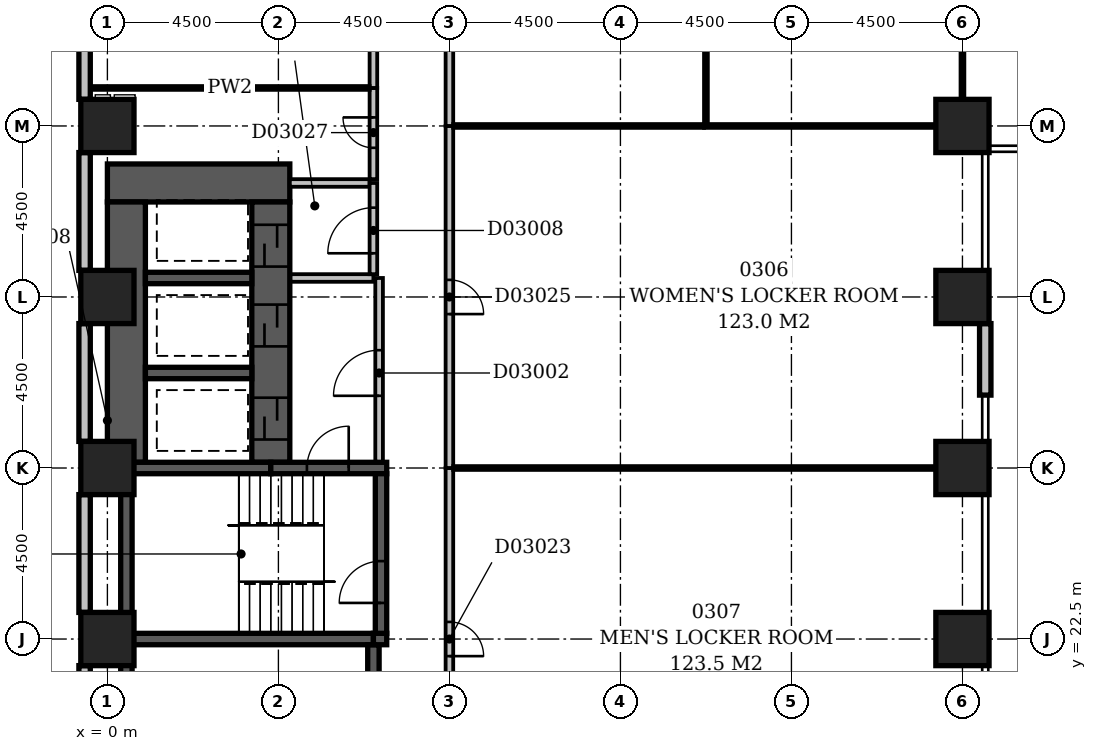
"""IFC4 building model, lengths in metres.
Left out: names, types, materials, properties, quantities, classifications, styles, units other than length and angle.
Written with IfcOpenShell. Run it as: python <this file> out.ifc"""

import sys

from ifc_helpers import new_model, si_unit, direction, frame, frame_2d, origin, origin_2d, place, context, subcontext, project, spatial, rectangle, extrude, element, fill, save


model = new_model("IFC4")
c1 = context("Model", 3, precision=1e-05, world=origin(), true_north=direction((0.0, 1.0)))
c2 = subcontext(c1, "Body", "Model", "MODEL_VIEW")
j1 = project(units=[si_unit("LENGTHUNIT", "METRE"), si_unit("PLANEANGLEUNIT", "RADIAN")], contexts=[c1])
p1 = place(None, origin())
s1 = spatial("IfcSite", under=j1, at=p1, CompositionType="ELEMENT")
p2 = place(p1, origin())
s2 = spatial("IfcBuilding", under=s1, at=p2, CompositionType="ELEMENT")
p3 = place(p2, frame((0.0, 0.0, 19.0)))
s3 = spatial("IfcBuildingStorey", under=s2, at=p3, CompositionType="ELEMENT", Elevation=19.0)
p4 = place(p3, frame((0.0, 34.5, -0.4), z_axis=(0.0, 0.0, 1.0), x_axis=(1.0, 0.0, 0.0)))
e1 = element("IfcWall", 1, at=p4, inside=s3, PredefinedType="SHEAR", context=c2, shape_type="SweptSolid", body=[
    extrude(rectangle(XDim=4.8, YDim=1.0, at=frame_2d((2.4, 0.0))), origin(), (0.0, 0.0, 1.0), 4.95),
])
p5 = place(p3, frame((0.35, 22.5, -0.4), z_axis=(0.0, 0.0, 1.0), x_axis=(1.0, 0.0, 0.0)))
e2 = element("IfcWall", 2, at=p5, inside=s3, PredefinedType="SHEAR", context=c2, shape_type="SweptSolid", body=[
    extrude(rectangle(XDim=6.65, YDim=0.3, at=frame_2d((3.325, 0.0))), origin(), (0.0, 0.0, 1.0), 4.95),
])
p6 = place(p3, frame((0.35, 27.0, -0.4), z_axis=(0.0, 0.0, 1.0), x_axis=(1.0, 0.0, 0.0)))
e3 = element("IfcWall", 3, at=p6, inside=s3, PredefinedType="SHEAR", context=c2, shape_type="SweptSolid", body=[
    extrude(rectangle(XDim=3.95, YDim=0.3, at=frame_2d((1.975, 0.0))), origin(), (0.0, 0.0, 1.0), 4.95),
])
p7 = place(p3, frame((0.5, 18.65, -0.4), z_axis=(0.0, 0.0, 1.0), x_axis=(0.0, 1.0, 0.0)))
e4 = element("IfcWall", 4, at=p7, inside=s3, PredefinedType="SHEAR", context=c2, shape_type="SweptSolid", body=[
    extrude(rectangle(XDim=3.7, YDim=0.3, at=frame_2d((1.85, 0.0))), origin(), (0.0, 0.0, 1.0), 4.95),
])
p8 = place(p3, frame((0.5, 22.65, -0.4), z_axis=(0.0, 0.0, 1.0), x_axis=(0.0, 1.0, 0.0)))
e5 = element("IfcWall", 5, at=p8, inside=s3, PredefinedType="SHEAR", context=c2, shape_type="SweptSolid", body=[
    extrude(rectangle(XDim=4.2, YDim=0.3, at=frame_2d((2.1, 0.0))), origin(), (0.0, 0.0, 1.0), 4.95),
])
p9 = place(p3, frame((0.5, 27.15, -0.4), z_axis=(0.0, 0.0, 1.0), x_axis=(0.0, 1.0, 0.0)))
e6 = element("IfcWall", 6, at=p9, inside=s3, PredefinedType="SHEAR", context=c2, shape_type="SweptSolid", body=[
    extrude(rectangle(XDim=6.85, YDim=1.0, at=frame_2d((3.425, 0.0))), origin(), (0.0, 0.0, 1.0), 4.95),
])
for number, where, z_axis, x_axis in (
    (7, (1.0, 29.5, -0.4), (0.0, 0.0, 1.0), (1.0, 0.0, 0.0)),
    (8, (1.0, 32.0, -0.4), (0.0, 0.0, 1.0), (1.0, 0.0, 0.0)),
):
    element("IfcWall", number, at=place(p3, frame(where, z_axis=z_axis, x_axis=x_axis)), inside=s3, PredefinedType="SHEAR", context=c2, shape_type="SweptSolid", body=[
        extrude(rectangle(XDim=2.8, YDim=0.3, at=frame_2d((1.4, 0.0))), origin(), (0.0, 0.0, 1.0), 4.95),
    ])
p10 = place(p3, frame((4.3, 27.0, -0.4), z_axis=(0.0, 0.0, 1.0), x_axis=(1.0, 0.0, 0.0)))
e9 = element("IfcWall", 9, at=p10, inside=s3, PredefinedType="SHEAR", context=c2, shape_type="SweptSolid", body=[
    extrude(rectangle(XDim=3.05, YDim=0.3, at=frame_2d((1.525, 0.0))), origin(), (0.0, 0.0, 1.0), 4.95),
])
p11 = place(p10, frame((0.95, 0.0, 0.4)))
e10 = element("IfcOpeningElement", 10, at=p11, cuts=e9, PredefinedType="OPENING", context=c2, shape_type="SweptSolid", body=[
    extrude(rectangle(XDim=1.1, YDim=2.1, at=frame_2d((0.55, 1.05))), frame((0.0, 0.162, 0.0), z_axis=(0.0, -1.0, 0.0), x_axis=(1.0, 0.0, 0.0)), (0.0, 0.0, 1.0), 0.324),
])
p12 = place(p3, frame((4.3, 27.15, -0.4), z_axis=(0.0, 0.0, 1.0), x_axis=(0.0, 1.0, 0.0)))
e11 = element("IfcWall", 11, at=p12, inside=s3, PredefinedType="SHEAR", context=c2, shape_type="SweptSolid", body=[
    extrude(rectangle(XDim=6.85, YDim=1.0, at=frame_2d((3.425, 0.0))), origin(), (0.0, 0.0, 1.0), 4.95),
])
p13 = place(p12, frame((3.05, 0.0, 0.4)))
e12 = element("IfcOpeningElement", 12, at=p13, cuts=e11, PredefinedType="OPENING", context=c2, shape_type="SweptSolid", body=[
    extrude(rectangle(XDim=1.1, YDim=2.1, at=frame_2d((0.55, 1.05))), frame((0.0, 0.512, 0.0), z_axis=(0.0, -1.0, 0.0), x_axis=(1.0, 0.0, 0.0)), (0.0, 0.0, 1.0), 1.024),
])
p14 = place(p12, frame((0.6, 0.0, 0.4)))
e13 = element("IfcOpeningElement", 13, at=p14, cuts=e11, PredefinedType="OPENING", context=c2, shape_type="SweptSolid", body=[
    extrude(rectangle(XDim=1.1, YDim=2.1, at=frame_2d((0.55, 1.05))), frame((0.0, 0.512, 0.0), z_axis=(0.0, -1.0, 0.0), x_axis=(1.0, 0.0, 0.0)), (0.0, 0.0, 1.0), 1.024),
])
p15 = place(p12, frame((5.15, 0.0, 0.4)))
e14 = element("IfcOpeningElement", 14, at=p15, cuts=e11, PredefinedType="OPENING", context=c2, shape_type="SweptSolid", body=[
    extrude(rectangle(XDim=1.1, YDim=2.1, at=frame_2d((0.55, 1.05))), frame((0.0, 0.512, 0.0), z_axis=(0.0, -1.0, 0.0), x_axis=(1.0, 0.0, 0.0)), (0.0, 0.0, 1.0), 1.024),
])
p16 = place(p3, frame((7.0, 18.65, -0.4), z_axis=(0.0, 0.0, 1.0), x_axis=(0.0, 1.0, 0.0)))
e15 = element("IfcWall", 15, at=p16, inside=s3, PredefinedType="SHEAR", context=c2, shape_type="SweptSolid", body=[
    extrude(rectangle(XDim=3.7, YDim=0.3, at=frame_2d((1.85, 0.0))), origin(), (0.0, 0.0, 1.0), 4.95),
])
p17 = place(p16, frame((1.35, 0.0, 0.4)))
e16 = element("IfcOpeningElement", 16, at=p17, cuts=e15, PredefinedType="OPENING", context=c2, shape_type="SweptSolid", body=[
    extrude(rectangle(XDim=1.0, YDim=2.1, at=frame_2d((0.5, 1.05))), frame((0.0, 0.162, 0.0), z_axis=(0.0, -1.0, 0.0), x_axis=(1.0, 0.0, 0.0)), (0.0, 0.0, 1.0), 0.324),
])
p18 = place(p3, frame((7.0, 22.5, -0.4), z_axis=(0.0, 0.0, 1.0), x_axis=(1.0, 0.0, 0.0)))
e17 = element("IfcWall", 17, at=p18, inside=s3, PredefinedType="SHEAR", context=c2, shape_type="SweptSolid", body=[
    extrude(rectangle(XDim=0.35, YDim=0.3, at=frame_2d((0.175, 0.0))), origin(), (0.0, 0.0, 1.0), 4.95),
])
p19 = place(p3, frame((7.2, 22.65, -0.4), z_axis=(0.0, 0.0, 1.0), x_axis=(0.0, 1.0, 0.0)))
e18 = element("IfcWall", 18, at=p19, inside=s3, PredefinedType="SHEAR", context=c2, shape_type="SweptSolid", body=[
    extrude(rectangle(XDim=4.2, YDim=0.3, at=frame_2d((2.1, 0.0))), origin(), (0.0, 0.0, 1.0), 4.95),
])
p20 = place(p19, frame((0.8, 0.0, 0.4)))
e19 = element("IfcOpeningElement", 19, at=p20, cuts=e18, PredefinedType="OPENING", context=c2, shape_type="SweptSolid", body=[
    extrude(rectangle(XDim=1.1, YDim=2.1, at=frame_2d((0.55, 1.05))), frame((0.0, 0.162, 0.0), z_axis=(0.0, -1.0, 0.0), x_axis=(1.0, 0.0, 0.0)), (0.0, 0.0, 1.0), 0.324),
])
for number, where, z_axis, x_axis in (
    (20, (0.0, 22.5, -0.4), (0.0, 0.0, 1.0), (1.0, 0.0, 0.0)),
    (21, (22.5, 22.5, -0.4), (0.0, 0.0, 1.0), (1.0, 0.0, 0.0)),
    (22, (0.0, 27.0, -0.4), (0.0, 0.0, 1.0), (1.0, 0.0, 0.0)),
    (23, (22.5, 27.0, -0.4), (0.0, 0.0, 1.0), (1.0, 0.0, 0.0)),
    (24, (0.0, 31.5, -0.4), (0.0, 0.0, 1.0), (1.0, 0.0, 0.0)),
    (25, (22.5, 31.5, -0.4), (0.0, 0.0, 1.0), (1.0, 0.0, 0.0)),
    (26, (0.0, 36.0, -0.4), (0.0, 0.0, 1.0), (1.0, 0.0, 0.0)),
    (27, (22.5, 36.0, -0.4), (0.0, 0.0, 1.0), (1.0, 0.0, 0.0)),
):
    element("IfcColumn", number, at=place(p3, frame(where, z_axis=z_axis, x_axis=x_axis)), inside=s3, PredefinedType="COLUMN", context=c2, shape_type="SweptSolid", body=[
        extrude(rectangle(XDim=1.4, YDim=1.4, at=origin_2d()), origin(), (0.0, 0.0, 1.0), 4.95),
    ])
p21 = place(p3, frame((23.1, 28.918, 0.0), z_axis=(0.0, 0.0, 1.0), x_axis=(0.0, 1.0, 0.0)))
e28 = element("IfcWall", 28, at=p21, inside=s3, PredefinedType="STANDARD", context=c2, shape_type="SweptSolid", body=[
    extrude(rectangle(XDim=1.882, YDim=0.3, at=frame_2d((0.941, 0.0))), origin(), (0.0, 0.0, 1.0), 3.9),
])
for number, where, z_axis, x_axis in (
    (29, (-0.6, 39.8, 0.0), (0.0, 0.0, 1.0), (0.0, -1.0, 0.0)),
    (30, (-0.6, 35.3, 0.0), (0.0, 0.0, 1.0), (0.0, -1.0, 0.0)),
    (31, (-0.6, 30.8, 0.0), (0.0, 0.0, 1.0), (0.0, -1.0, 0.0)),
    (32, (-0.6, 26.3, 0.0), (0.0, 0.0, 1.0), (0.0, -1.0, 0.0)),
    (33, (-0.6, 21.8, 0.0), (0.0, 0.0, 1.0), (0.0, -1.0, 0.0)),
):
    element("IfcWall", number, at=place(p3, frame(where, z_axis=z_axis, x_axis=x_axis)), inside=s3, PredefinedType="STANDARD", context=c2, shape_type="SweptSolid", body=[
        extrude(rectangle(XDim=3.1, YDim=0.3, at=frame_2d((1.55, 0.0))), origin(), (0.0, 0.0, 1.0), 3.9),
    ])
p22 = place(p3, frame((4.82, 32.0, 0.0), z_axis=(0.0, 0.0, 1.0), x_axis=(1.0, 0.0, 0.0)))
e34 = element("IfcWall", 34, at=p22, inside=s3, PredefinedType="PARTITIONING", context=c2, shape_type="SweptSolid", body=[
    extrude(rectangle(XDim=2.18, YDim=0.2, at=frame_2d((1.09, 0.0))), origin(), (0.0, 0.0, 1.0), 4.55),
])
p23 = place(p3, frame((7.0, 32.1, 0.0), z_axis=(0.0, 0.0, 1.0), x_axis=(0.0, 1.0, 0.0)))
e35 = element("IfcWall", 35, at=p23, inside=s3, PredefinedType="PARTITIONING", context=c2, shape_type="SweptSolid", body=[
    extrude(rectangle(XDim=2.4, YDim=0.2, at=frame_2d((1.2, 0.0))), origin(), (0.0, 0.0, 1.0), 4.55),
])
p24 = place(p23, frame((0.55, 0.0, 0.0)))
e36 = element("IfcOpeningElement", 36, at=p24, cuts=e35, PredefinedType="OPENING", context=c2, shape_type="SweptSolid", body=[
    extrude(rectangle(XDim=1.2, YDim=2.1, at=frame_2d((0.6, 1.05))), frame((0.0, 0.112, 0.0), z_axis=(0.0, -1.0, 0.0), x_axis=(1.0, 0.0, 0.0)), (0.0, 0.0, 1.0), 0.224),
])
p25 = place(p3, frame((4.8, 34.5, 0.0), z_axis=(0.0, 0.0, 1.0), x_axis=(1.0, 0.0, 0.0)))
e37 = element("IfcWall", 37, at=p25, inside=s3, PredefinedType="PARTITIONING", context=c2, shape_type="SweptSolid", body=[
    extrude(rectangle(XDim=2.1, YDim=0.2, at=frame_2d((1.05, 0.0))), origin(), (0.0, 0.0, 1.0), 4.55),
])
p26 = place(p3, frame((7.15, 27.17, 0.0), z_axis=(0.0, 0.0, 1.0), x_axis=(0.0, 1.0, 0.0)))
e38 = element("IfcWall", 38, at=p26, inside=s3, PredefinedType="PARTITIONING", context=c2, shape_type="SweptSolid", body=[
    extrude(rectangle(XDim=4.83, YDim=0.2, at=frame_2d((2.415, 0.0))), origin(), (0.0, 0.0, 1.0), 4.55),
])
p27 = place(p26, frame((1.73, 0.0, 0.0)))
e39 = element("IfcOpeningElement", 39, at=p27, cuts=e38, PredefinedType="OPENING", context=c2, shape_type="SweptSolid", body=[
    extrude(rectangle(XDim=1.2, YDim=2.1, at=frame_2d((0.6, 1.05))), frame((0.0, 0.112, 0.0), z_axis=(0.0, -1.0, 0.0), x_axis=(1.0, 0.0, 0.0)), (0.0, 0.0, 1.0), 0.224),
])
p28 = place(p3, frame((9.0, 18.0, 0.0), z_axis=(0.0, 0.0, 1.0), x_axis=(0.0, 1.0, 0.0)))
e40 = element("IfcWall", 40, at=p28, inside=s3, PredefinedType="PARTITIONING", context=c2, shape_type="SweptSolid", body=[
    extrude(rectangle(XDim=9.0, YDim=0.2, at=frame_2d((4.5, 0.0))), origin(), (0.0, 0.0, 1.0), 4.55),
])
p29 = place(p28, frame((4.05, 0.0, 0.0)))
e41 = element("IfcOpeningElement", 41, at=p29, cuts=e40, PredefinedType="OPENING", context=c2, shape_type="SweptSolid", body=[
    extrude(rectangle(XDim=0.9, YDim=2.1, at=frame_2d((0.45, 1.05))), frame((0.0, 0.112, 0.0), z_axis=(0.0, -1.0, 0.0), x_axis=(1.0, 0.0, 0.0)), (0.0, 0.0, 1.0), 0.224),
])
p30 = place(p3, frame((9.0, 27.0, 0.0), z_axis=(0.0, 0.0, 1.0), x_axis=(0.0, 1.0, 0.0)))
e42 = element("IfcWall", 42, at=p30, inside=s3, PredefinedType="PARTITIONING", context=c2, shape_type="SweptSolid", body=[
    extrude(rectangle(XDim=9.0, YDim=0.2, at=frame_2d((4.5, 0.0))), origin(), (0.0, 0.0, 1.0), 4.55),
])
p31 = place(p30, frame((4.05, 0.0, 0.0)))
e43 = element("IfcOpeningElement", 43, at=p31, cuts=e42, PredefinedType="OPENING", context=c2, shape_type="SweptSolid", body=[
    extrude(rectangle(XDim=0.9, YDim=2.1, at=frame_2d((0.45, 1.05))), frame((0.0, 0.112, 0.0), z_axis=(0.0, -1.0, 0.0), x_axis=(1.0, 0.0, 0.0)), (0.0, 0.0, 1.0), 0.224),
])
p32 = place(p3, frame((22.5, 27.0, 0.0), z_axis=(0.0, 0.0, 1.0), x_axis=(-1.0, 0.0, 0.0)))
e44 = element("IfcWall", 44, at=p32, inside=s3, PredefinedType="PARTITIONING", context=c2, shape_type="SweptSolid", body=[
    extrude(rectangle(XDim=13.4, YDim=0.1, at=frame_2d((6.7, 0.0))), origin(), (0.0, 0.0, 1.0), 3.95),
])
p33 = place(p3, frame((22.5, 35.35, 0.0), z_axis=(0.0, 0.0, 1.0), x_axis=(0.0, 1.0, 0.0)))
e45 = element("IfcWall", 45, at=p33, inside=s3, PredefinedType="PARTITIONING", context=c2, shape_type="SweptSolid", body=[
    extrude(rectangle(XDim=0.6, YDim=0.1, at=frame_2d((0.3, 0.0))), origin(), (0.0, 0.0, 1.0), 3.9),
])
p34 = place(p3, frame((9.0, 36.0, 0.0), z_axis=(0.0, 0.0, 1.0), x_axis=(0.0, 1.0, 0.0)))
e46 = element("IfcWall", 46, at=p34, inside=s3, PredefinedType="PARTITIONING", context=c2, shape_type="SweptSolid", body=[
    extrude(rectangle(XDim=13.4, YDim=0.2, at=frame_2d((6.7, 0.0))), origin(), (0.0, 0.0, 1.0), 4.55),
])
p35 = place(p34, frame((6.225, 0.0, 0.0)))
e47 = element("IfcOpeningElement", 47, at=p35, cuts=e46, PredefinedType="OPENING", context=c2, shape_type="SweptSolid", body=[
    extrude(rectangle(XDim=0.9, YDim=2.1, at=frame_2d((0.45, 1.05))), frame((0.0, 0.112, 0.0), z_axis=(0.0, -1.0, 0.0), x_axis=(1.0, 0.0, 0.0)), (0.0, 0.0, 1.0), 0.224),
])
p36 = place(p3, frame((15.7, 36.0, 0.0), z_axis=(0.0, 0.0, 1.0), x_axis=(-1.0, 0.0, 0.0)))
e48 = element("IfcWall", 48, at=p36, inside=s3, PredefinedType="PARTITIONING", context=c2, shape_type="SweptSolid", body=[
    extrude(rectangle(XDim=6.6, YDim=0.1, at=frame_2d((3.3, 0.0))), origin(), (0.0, 0.0, 1.0), 3.65),
])
p37 = place(p3, frame((22.55, 36.0, 0.0), z_axis=(0.0, 0.0, 1.0), x_axis=(-1.0, 0.0, 0.0)))
e49 = element("IfcWall", 49, at=p37, inside=s3, PredefinedType="PARTITIONING", context=c2, shape_type="SweptSolid", body=[
    extrude(rectangle(XDim=6.85, YDim=0.1, at=frame_2d((3.425, 0.0))), origin(), (0.0, 0.0, 1.0), 3.65),
])
p38 = place(p3, frame((22.5, 36.05, 0.0), z_axis=(0.0, 0.0, 1.0), x_axis=(0.0, 1.0, 0.0)))
e50 = element("IfcWall", 50, at=p38, inside=s3, PredefinedType="PARTITIONING", context=c2, shape_type="SweptSolid", body=[
    extrude(rectangle(XDim=13.35, YDim=0.1, at=frame_2d((6.675, 0.0))), origin(), (0.0, 0.0, 1.0), 4.55),
])
p39 = place(p3, frame((-0.45, 37.0, 0.0), z_axis=(0.0, 0.0, 1.0), x_axis=(1.0, 0.0, 0.0)))
e51 = element("IfcWall", 51, at=p39, inside=s3, PredefinedType="PARTITIONING", context=c2, shape_type="SweptSolid", body=[
    extrude(rectangle(XDim=7.35, YDim=0.1, at=frame_2d((3.675, 0.0))), origin(), (0.0, 0.0, 1.0), 4.55),
])
p40 = place(p3, frame((7.0, 37.0, 0.0), z_axis=(0.0, 0.0, 1.0), x_axis=(0.0, -1.0, 0.0)))
e52 = element("IfcWall", 52, at=p40, inside=s3, PredefinedType="PARTITIONING", context=c2, shape_type="SweptSolid", body=[
    extrude(rectangle(XDim=2.4, YDim=0.2, at=frame_2d((1.2, 0.0))), origin(), (0.0, 0.0, 1.0), 4.55),
])
p41 = place(p40, frame((0.775, 0.0, 0.0)))
e53 = element("IfcOpeningElement", 53, at=p41, cuts=e52, PredefinedType="OPENING", context=c2, shape_type="SweptSolid", body=[
    extrude(rectangle(XDim=0.8, YDim=2.1, at=frame_2d((0.4, 1.05))), frame((0.0, 0.112, 0.0), z_axis=(0.0, -1.0, 0.0), x_axis=(1.0, 0.0, 0.0)), (0.0, 0.0, 1.0), 0.224),
])
p42 = place(p3, frame((7.0, 49.4, 0.0), z_axis=(0.0, 0.0, 1.0), x_axis=(0.0, -1.0, 0.0)))
e54 = element("IfcWall", 54, at=p42, inside=s3, PredefinedType="PARTITIONING", context=c2, shape_type="SweptSolid", body=[
    extrude(rectangle(XDim=12.4, YDim=0.2, at=frame_2d((6.2, 0.0))), origin(), (0.0, 0.0, 1.0), 4.55),
])
p43 = place(p42, frame((5.775, 0.0, 0.0)))
e55 = element("IfcOpeningElement", 55, at=p43, cuts=e54, PredefinedType="OPENING", context=c2, shape_type="SweptSolid", body=[
    extrude(rectangle(XDim=0.9, YDim=2.1, at=frame_2d((0.45, 1.05))), frame((0.0, 0.112, 0.0), z_axis=(0.0, -1.0, 0.0), x_axis=(1.0, 0.0, 0.0)), (0.0, 0.0, 1.0), 0.224),
])
p44 = place(p3, frame((15.75, 49.4, 0.0), z_axis=(0.0, 0.0, 1.0), x_axis=(0.0, -1.0, 0.0)))
e56 = element("IfcWall", 56, at=p44, inside=s3, PredefinedType="PARTITIONING", context=c2, shape_type="SweptSolid", body=[
    extrude(rectangle(XDim=13.35, YDim=0.1, at=frame_2d((6.675, 0.0))), origin(), (0.0, 0.0, 1.0), 4.55),
])
p45 = place(p27, origin())
e57 = element("IfcDoor", 57, at=p45, inside=s3, OperationType="SINGLE_SWING_LEFT", PredefinedType="DOOR", context=c2, shape_type="SweptSolid", body=[
    extrude(rectangle(XDim=1.2, YDim=2.1, at=frame_2d((0.6, 1.05))), frame((0.0, 0.025, 0.0), z_axis=(0.0, -1.0, 0.0), x_axis=(1.0, 0.0, 0.0)), (0.0, 0.0, 1.0), 0.05),
])
fill(e39, e57)
p46 = place(p13, origin())
e58 = element("IfcDoor", 58, at=p46, inside=s3, OperationType="SLIDING_TO_LEFT", PredefinedType="DOOR", context=c2, shape_type="SweptSolid", body=[
    extrude(rectangle(XDim=1.1, YDim=2.1, at=frame_2d((0.55, 1.05))), frame((0.0, 0.025, 0.0), z_axis=(0.0, -1.0, 0.0), x_axis=(1.0, 0.0, 0.0)), (0.0, 0.0, 1.0), 0.05),
])
fill(e12, e58)
p47 = place(p14, origin())
e59 = element("IfcDoor", 59, at=p47, inside=s3, OperationType="SLIDING_TO_LEFT", PredefinedType="DOOR", context=c2, shape_type="SweptSolid", body=[
    extrude(rectangle(XDim=1.1, YDim=2.1, at=frame_2d((0.55, 1.05))), frame((0.0, 0.025, 0.0), z_axis=(0.0, -1.0, 0.0), x_axis=(1.0, 0.0, 0.0)), (0.0, 0.0, 1.0), 0.05),
])
fill(e13, e59)
p48 = place(p24, origin())
e60 = element("IfcDoor", 60, at=p48, inside=s3, OperationType="SINGLE_SWING_LEFT", PredefinedType="DOOR", context=c2, shape_type="SweptSolid", body=[
    extrude(rectangle(XDim=1.2, YDim=2.1, at=frame_2d((0.6, 1.05))), frame((0.0, 0.025, 0.0), z_axis=(0.0, -1.0, 0.0), x_axis=(1.0, 0.0, 0.0)), (0.0, 0.0, 1.0), 0.05),
])
fill(e36, e60)
p49 = place(p15, origin())
e61 = element("IfcDoor", 61, at=p49, inside=s3, OperationType="SLIDING_TO_LEFT", PredefinedType="DOOR", context=c2, shape_type="SweptSolid", body=[
    extrude(rectangle(XDim=1.1, YDim=2.1, at=frame_2d((0.55, 1.05))), frame((0.0, 0.025, 0.0), z_axis=(0.0, -1.0, 0.0), x_axis=(1.0, 0.0, 0.0)), (0.0, 0.0, 1.0), 0.05),
])
fill(e14, e61)
p50 = place(p11, frame((1.1, 0.0, 0.0), z_axis=(0.0, 0.0, 1.0), x_axis=(-1.0, 0.0, 0.0)))
e62 = element("IfcDoor", 62, at=p50, inside=s3, OperationType="SINGLE_SWING_LEFT", PredefinedType="DOOR", context=c2, shape_type="SweptSolid", body=[
    extrude(rectangle(XDim=1.1, YDim=2.1, at=frame_2d((0.55, 1.05))), frame((0.0, 0.025, 0.0), z_axis=(0.0, -1.0, 0.0), x_axis=(1.0, 0.0, 0.0)), (0.0, 0.0, 1.0), 0.05),
])
fill(e10, e62)
p51 = place(p20, origin())
e63 = element("IfcDoor", 63, at=p51, inside=s3, OperationType="SINGLE_SWING_LEFT", PredefinedType="DOOR", context=c2, shape_type="SweptSolid", body=[
    extrude(rectangle(XDim=1.1, YDim=2.1, at=frame_2d((0.55, 1.05))), frame((0.0, 0.025, 0.0), z_axis=(0.0, -1.0, 0.0), x_axis=(1.0, 0.0, 0.0)), (0.0, 0.0, 1.0), 0.05),
])
fill(e19, e63)
p52 = place(p29, frame((0.9, 0.0, 0.0), z_axis=(0.0, 0.0, 1.0), x_axis=(-1.0, 0.0, 0.0)))
e64 = element("IfcDoor", 64, at=p52, inside=s3, OperationType="SINGLE_SWING_RIGHT", PredefinedType="DOOR", context=c2, shape_type="SweptSolid", body=[
    extrude(rectangle(XDim=0.9, YDim=2.1, at=frame_2d((0.45, 1.05))), frame((0.0, 0.025, 0.0), z_axis=(0.0, -1.0, 0.0), x_axis=(1.0, 0.0, 0.0)), (0.0, 0.0, 1.0), 0.05),
])
fill(e41, e64)
p53 = place(p31, frame((0.9, 0.0, 0.0), z_axis=(0.0, 0.0, 1.0), x_axis=(-1.0, 0.0, 0.0)))
e65 = element("IfcDoor", 65, at=p53, inside=s3, OperationType="SINGLE_SWING_RIGHT", PredefinedType="DOOR", context=c2, shape_type="SweptSolid", body=[
    extrude(rectangle(XDim=0.9, YDim=2.1, at=frame_2d((0.45, 1.05))), frame((0.0, 0.025, 0.0), z_axis=(0.0, -1.0, 0.0), x_axis=(1.0, 0.0, 0.0)), (0.0, 0.0, 1.0), 0.05),
])
fill(e43, e65)
p54 = place(p41, frame((0.8, 0.0, 0.0), z_axis=(0.0, 0.0, 1.0), x_axis=(-1.0, 0.0, 0.0)))
e66 = element("IfcDoor", 66, at=p54, inside=s3, OperationType="SINGLE_SWING_RIGHT", PredefinedType="DOOR", context=c2, shape_type="SweptSolid", body=[
    extrude(rectangle(XDim=0.8, YDim=2.1, at=frame_2d((0.4, 1.05))), frame((0.0, 0.025, 0.0), z_axis=(0.0, -1.0, 0.0), x_axis=(1.0, 0.0, 0.0)), (0.0, 0.0, 1.0), 0.05),
])
fill(e53, e66)
save(model, sys.argv[1])
